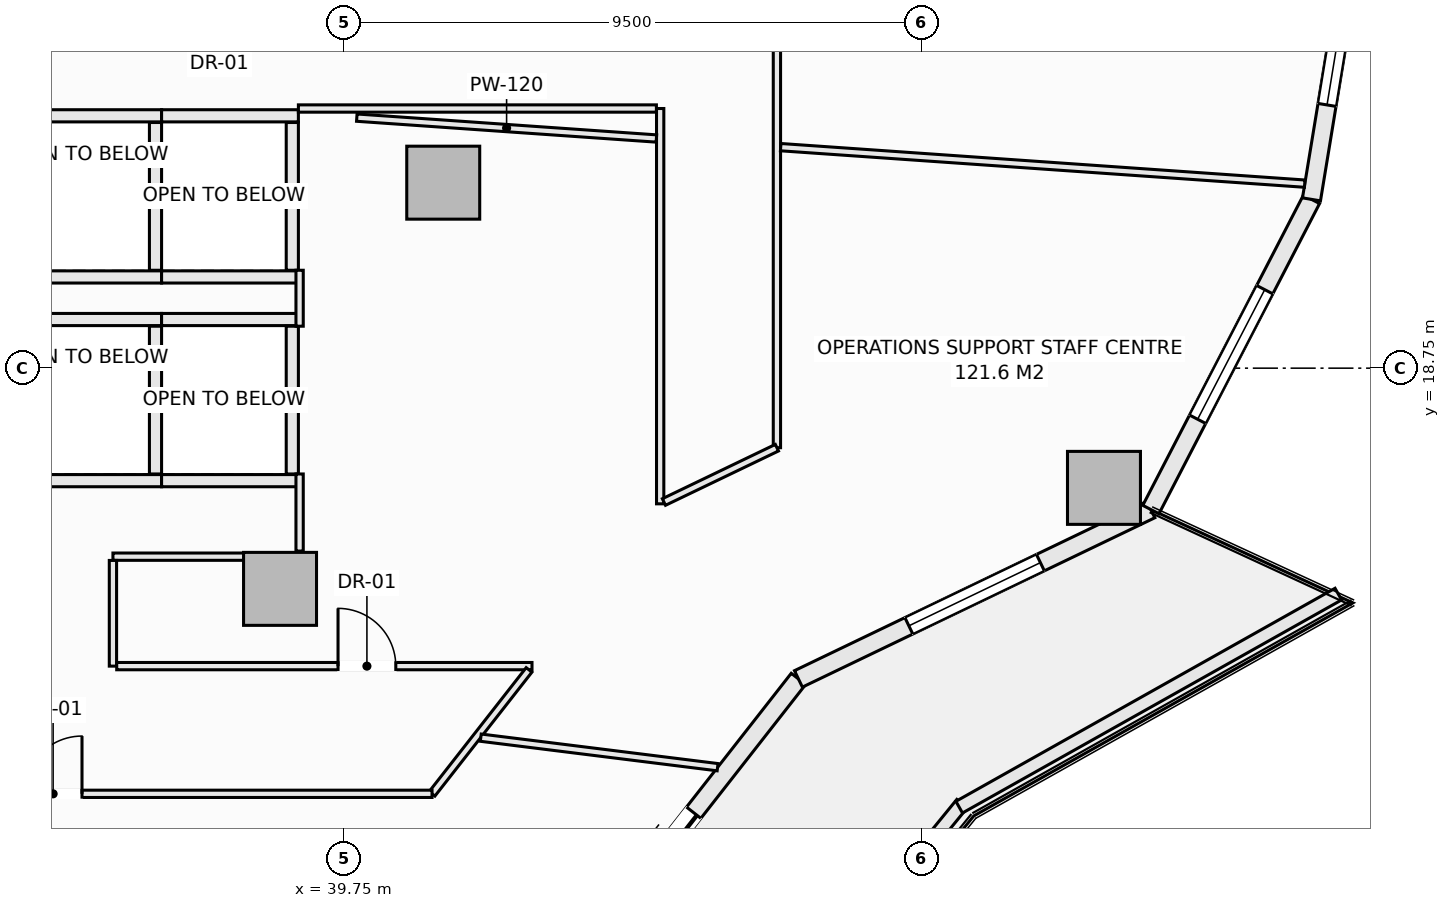
"""IFC4 building model, lengths in metres.
Left out: names, types, materials, properties, quantities, classifications, styles, units other than length and angle.
Written with IfcOpenShell. Run it as: python <this file> out.ifc"""

import sys

from ifc_helpers import new_model, si_unit, direction, frame, frame_2d, origin, origin_2d, place, context, subcontext, project, spatial, rectangle, extrude, element, fill, save


model = new_model("IFC4")
c1 = context("Model", 3, precision=1e-05, world=origin(), true_north=direction((0.0, 1.0)))
c2 = subcontext(c1, "Body", "Model", "MODEL_VIEW")
j1 = project(units=[si_unit("LENGTHUNIT", "METRE"), si_unit("PLANEANGLEUNIT", "RADIAN")], contexts=[c1])
p1 = place(None, origin())
s1 = spatial("IfcSite", under=j1, at=p1, CompositionType="ELEMENT")
p2 = place(p1, origin())
s2 = spatial("IfcBuilding", under=s1, at=p2, CompositionType="ELEMENT")
p3 = place(p2, frame((0.0, 0.0, 84.25)))
s3 = spatial("IfcBuildingStorey", under=s2, at=p3, CompositionType="ELEMENT", Elevation=84.25)
for number, where, z_axis, x_axis in (
    (1, (52.249, 16.781, -0.28), (0.0, 0.0, 1.0), (1.0, 0.0, 0.0)),
    (2, (38.698, 15.121, -0.28), (0.0, 0.0, 1.0), (1.0, 0.0, 0.0)),
    (3, (41.382, 21.801, -0.28), (0.0, 0.0, 1.0), (1.0, 0.0, 0.0)),
):
    element("IfcColumn", number, at=place(p3, frame(where, z_axis=z_axis, x_axis=x_axis)), inside=s3, PredefinedType="COLUMN", context=c2, shape_type="SweptSolid", body=[
        extrude(rectangle(XDim=1.2, YDim=1.2, at=origin_2d()), origin(), (0.0, 0.0, 1.0), 3.85),
    ])
p4 = place(p3, frame((43.344, 8.684, 0.0), z_axis=(0.0, 0.0, 1.0), x_axis=(0.616434798832, 0.78740595552, 0.0)))
e4 = element("IfcWall", 4, at=p4, inside=s3, PredefinedType="SOLIDWALL", context=c2, shape_type="SweptSolid", body=[
    extrude(rectangle(XDim=6.294, YDim=0.3, at=frame_2d((3.147, 0.0))), origin(), (0.0, 0.0, 1.0), 3.093),
])
p5 = place(p4, frame((1.7, 0.0, 0.0)))
e5 = element("IfcOpeningElement", 5, at=p5, cuts=e4, PredefinedType="OPENING", context=c2, shape_type="SweptSolid", body=[
    extrude(rectangle(XDim=1.8, YDim=2.25, at=frame_2d((0.9, 1.125))), frame((0.0, 0.16, 0.0), z_axis=(0.0, -1.0, 0.0), x_axis=(1.0, 0.0, 0.0)), (0.0, 0.0, 1.0), 0.32),
])
p6 = place(p3, frame((47.224, 13.64, 0.0), z_axis=(0.0, 0.0, 1.0), x_axis=(0.901354747727, 0.433081538224, 0.0)))
e6 = element("IfcWall", 6, at=p6, inside=s3, PredefinedType="SOLIDWALL", context=c2, shape_type="SweptSolid", body=[
    extrude(rectangle(XDim=6.431, YDim=0.3, at=frame_2d((3.215, 0.0))), origin(), (0.0, 0.0, 1.0), 3.093),
])
p7 = place(p6, frame((2.015, 0.0, 0.85)))
e7 = element("IfcOpeningElement", 7, at=p7, cuts=e6, PredefinedType="OPENING", context=c2, shape_type="SweptSolid", body=[
    extrude(rectangle(XDim=2.4, YDim=1.9, at=frame_2d((1.2, 0.95))), frame((0.0, 0.16, 0.0), z_axis=(0.0, -1.0, 0.0), x_axis=(1.0, 0.0, 0.0)), (0.0, 0.0, 1.0), 0.32),
])
p8 = place(p3, frame((53.021, 16.425, 0.0), z_axis=(0.0, 0.0, 1.0), x_axis=(0.459800981414, 0.888021991558, 0.0)))
e8 = element("IfcWall", 8, at=p8, inside=s3, PredefinedType="SOLIDWALL", context=c2, shape_type="SweptSolid", body=[
    extrude(rectangle(XDim=5.744, YDim=0.3, at=frame_2d((2.872, 0.0))), origin(), (0.0, 0.0, 1.0), 3.093),
])
p9 = place(p8, frame((1.672, 0.0, 0.85)))
e9 = element("IfcOpeningElement", 9, at=p9, cuts=e8, PredefinedType="OPENING", context=c2, shape_type="SweptSolid", body=[
    extrude(rectangle(XDim=2.4, YDim=1.9, at=frame_2d((1.2, 0.95))), frame((0.0, 0.16, 0.0), z_axis=(0.0, -1.0, 0.0), x_axis=(1.0, 0.0, 0.0)), (0.0, 0.0, 1.0), 0.32),
])
p10 = place(p3, frame((55.662, 21.526, 0.0), z_axis=(0.0, 0.0, 1.0), x_axis=(0.162386212206, 0.986727276447, 0.0)))
e10 = element("IfcWall", 10, at=p10, inside=s3, PredefinedType="SOLIDWALL", context=c2, shape_type="SweptSolid", body=[
    extrude(rectangle(XDim=5.548, YDim=0.3, at=frame_2d((2.774, 0.0))), origin(), (0.0, 0.0, 1.0), 3.093),
])
p11 = place(p10, frame((1.574, 0.0, 0.85)))
e11 = element("IfcOpeningElement", 11, at=p11, cuts=e10, PredefinedType="OPENING", context=c2, shape_type="SweptSolid", body=[
    extrude(rectangle(XDim=2.4, YDim=1.9, at=frame_2d((1.2, 0.95))), frame((0.0, 0.16, 0.0), z_axis=(0.0, -1.0, 0.0), x_axis=(1.0, 0.0, 0.0)), (0.0, 0.0, 1.0), 0.32),
])
p12 = place(p3, frame((45.292, 5.918, 0.0), z_axis=(0.0, 0.0, 1.0), x_axis=(0.631819273026, 0.775115737315, 0.0)))
e12 = element("IfcWall", 12, at=p12, inside=s3, PredefinedType="PARAPET", context=c2, shape_type="SweptSolid", body=[
    extrude(rectangle(XDim=7.316, YDim=0.22, at=frame_2d((3.658, 0.0))), origin(), (0.0, 0.0, 1.0), 0.52),
])
p13 = place(p3, frame((49.868, 11.531, 0.0), z_axis=(0.0, 0.0, 1.0), x_axis=(0.871775109335, 0.489906275468, 0.0)))
e13 = element("IfcWall", 13, at=p13, inside=s3, PredefinedType="PARAPET", context=c2, shape_type="SweptSolid", body=[
    extrude(rectangle(XDim=7.152, YDim=0.22, at=frame_2d((3.576, 0.0))), origin(), (0.0, 0.0, 1.0), 0.52),
])
for number, where, z_axis, x_axis in (
    (14, (34.5, 19.55, 0.0), (0.0, 0.0, 1.0), (1.0, 0.0, 0.0)),
    (15, (34.5, 16.9, 0.0), (0.0, 0.0, 1.0), (1.0, 0.0, 0.0)),
):
    element("IfcWall", number, at=place(p3, frame(where, z_axis=z_axis, x_axis=x_axis)), inside=s3, PredefinedType="SOLIDWALL", context=c2, shape_type="SweptSolid", body=[
        extrude(rectangle(XDim=2.25, YDim=0.2, at=frame_2d((1.125, 0.0))), origin(), (0.0, 0.0, 1.0), 3.57),
    ])
p14 = place(p3, frame((36.65, 17.01, 0.0), z_axis=(0.0, 0.0, 1.0), x_axis=(0.0, 1.0, 0.0)))
e16 = element("IfcWall", 16, at=p14, inside=s3, PredefinedType="SOLIDWALL", context=c2, shape_type="SweptSolid", body=[
    extrude(rectangle(XDim=2.43, YDim=0.2, at=frame_2d((1.215, 0.0))), origin(), (0.0, 0.0, 1.0), 3.57),
])
for number, where, z_axis, x_axis in (
    (17, (36.75, 19.55, 0.0), (0.0, 0.0, 1.0), (1.0, 0.0, 0.0)),
    (18, (36.75, 16.9, 0.0), (0.0, 0.0, 1.0), (1.0, 0.0, 0.0)),
):
    element("IfcWall", number, at=place(p3, frame(where, z_axis=z_axis, x_axis=x_axis)), inside=s3, PredefinedType="SOLIDWALL", context=c2, shape_type="SweptSolid", body=[
        extrude(rectangle(XDim=2.25, YDim=0.2, at=frame_2d((1.125, 0.0))), origin(), (0.0, 0.0, 1.0), 3.57),
    ])
p15 = place(p3, frame((38.9, 17.01, 0.0), z_axis=(0.0, 0.0, 1.0), x_axis=(0.0, 1.0, 0.0)))
e19 = element("IfcWall", 19, at=p15, inside=s3, PredefinedType="SOLIDWALL", context=c2, shape_type="SweptSolid", body=[
    extrude(rectangle(XDim=2.43, YDim=0.2, at=frame_2d((1.215, 0.0))), origin(), (0.0, 0.0, 1.0), 3.57),
])
for number, where, z_axis, x_axis in (
    (20, (34.5, 22.9, 0.0), (0.0, 0.0, 1.0), (1.0, 0.0, 0.0)),
    (21, (34.5, 20.25, 0.0), (0.0, 0.0, 1.0), (1.0, 0.0, 0.0)),
):
    element("IfcWall", number, at=place(p3, frame(where, z_axis=z_axis, x_axis=x_axis)), inside=s3, PredefinedType="SOLIDWALL", context=c2, shape_type="SweptSolid", body=[
        extrude(rectangle(XDim=2.25, YDim=0.2, at=frame_2d((1.125, 0.0))), origin(), (0.0, 0.0, 1.0), 3.57),
    ])
p16 = place(p3, frame((36.65, 20.36, 0.0), z_axis=(0.0, 0.0, 1.0), x_axis=(0.0, 1.0, 0.0)))
e22 = element("IfcWall", 22, at=p16, inside=s3, PredefinedType="SOLIDWALL", context=c2, shape_type="SweptSolid", body=[
    extrude(rectangle(XDim=2.43, YDim=0.2, at=frame_2d((1.215, 0.0))), origin(), (0.0, 0.0, 1.0), 3.57),
])
for number, where, z_axis, x_axis in (
    (23, (36.75, 22.9, 0.0), (0.0, 0.0, 1.0), (1.0, 0.0, 0.0)),
    (24, (36.75, 20.25, 0.0), (0.0, 0.0, 1.0), (1.0, 0.0, 0.0)),
):
    element("IfcWall", number, at=place(p3, frame(where, z_axis=z_axis, x_axis=x_axis)), inside=s3, PredefinedType="SOLIDWALL", context=c2, shape_type="SweptSolid", body=[
        extrude(rectangle(XDim=2.25, YDim=0.2, at=frame_2d((1.125, 0.0))), origin(), (0.0, 0.0, 1.0), 3.57),
    ])
p17 = place(p3, frame((38.9, 20.36, 0.0), z_axis=(0.0, 0.0, 1.0), x_axis=(0.0, 1.0, 0.0)))
e25 = element("IfcWall", 25, at=p17, inside=s3, PredefinedType="SOLIDWALL", context=c2, shape_type="SweptSolid", body=[
    extrude(rectangle(XDim=2.43, YDim=0.2, at=frame_2d((1.215, 0.0))), origin(), (0.0, 0.0, 1.0), 3.57),
])
p18 = place(p3, frame((35.95, 15.65, 0.0), z_axis=(0.0, 0.0, 1.0), x_axis=(1.0, 0.0, 0.0)))
e26 = element("IfcWall", 26, at=p18, inside=s3, PredefinedType="PARTITIONING", context=c2, shape_type="SweptSolid", body=[
    extrude(rectangle(XDim=2.291, YDim=0.12, at=frame_2d((1.146, 0.0))), origin(), (0.0, 0.0, 1.0), 3.57),
])
p19 = place(p3, frame((35.95, 13.85, 0.0), z_axis=(0.0, 0.0, 1.0), x_axis=(0.0, 1.0, 0.0)))
e27 = element("IfcWall", 27, at=p19, inside=s3, PredefinedType="PARTITIONING", context=c2, shape_type="SweptSolid", body=[
    extrude(rectangle(XDim=1.738, YDim=0.12, at=frame_2d((0.869, 0.0))), origin(), (0.0, 0.0, 1.0), 3.57),
])
p20 = place(p3, frame((36.012, 13.85, 0.0), z_axis=(0.0, 0.0, 1.0), x_axis=(1.0, 0.0, 0.0)))
e28 = element("IfcWall", 28, at=p20, inside=s3, PredefinedType="PARTITIONING", context=c2, shape_type="SweptSolid", body=[
    extrude(rectangle(XDim=6.83, YDim=0.12, at=frame_2d((3.415, 0.0))), origin(), (0.0, 0.0, 1.0), 3.57),
])
p21 = place(p20, frame((3.64, 0.0, 0.0)))
e29 = element("IfcOpeningElement", 29, at=p21, cuts=e28, PredefinedType="OPENING", context=c2, shape_type="SweptSolid", body=[
    extrude(rectangle(XDim=0.95, YDim=2.1, at=frame_2d((0.475, 1.05))), frame((0.0, 0.07, 0.0), z_axis=(0.0, -1.0, 0.0), x_axis=(1.0, 0.0, 0.0)), (0.0, 0.0, 1.0), 0.14),
])
p22 = place(p3, frame((41.198, 11.75, 0.0), z_axis=(0.0, 0.0, 1.0), x_axis=(0.616412533256, 0.787423386016, 0.0)))
e30 = element("IfcWall", 30, at=p22, inside=s3, PredefinedType="PARTITIONING", context=c2, shape_type="SweptSolid", body=[
    extrude(rectangle(XDim=2.588, YDim=0.12, at=frame_2d((1.294, 0.0))), origin(), (0.0, 0.0, 1.0), 3.57),
])
p23 = place(p3, frame((23.4, 11.75, 0.0), z_axis=(0.0, 0.0, 1.0), x_axis=(1.0, 0.0, 0.0)))
e31 = element("IfcWall", 31, at=p23, inside=s3, PredefinedType="PARTITIONING", context=c2, shape_type="SweptSolid", body=[
    extrude(rectangle(XDim=17.798, YDim=0.12, at=frame_2d((8.899, 0.0))), origin(), (0.0, 0.0, 1.0), 3.57),
])
p24 = place(p23, frame((3.094, 0.0, 0.0)))
e32 = element("IfcOpeningElement", 32, at=p24, cuts=e31, PredefinedType="OPENING", context=c2, shape_type="SweptSolid", body=[
    extrude(rectangle(XDim=0.95, YDim=2.1, at=frame_2d((0.475, 1.05))), frame((0.0, 0.07, 0.0), z_axis=(0.0, -1.0, 0.0), x_axis=(1.0, 0.0, 0.0)), (0.0, 0.0, 1.0), 0.14),
])
p25 = place(p23, frame((11.091, 0.0, 0.0)))
e33 = element("IfcOpeningElement", 33, at=p25, cuts=e31, PredefinedType="OPENING", context=c2, shape_type="SweptSolid", body=[
    extrude(rectangle(XDim=0.95, YDim=2.1, at=frame_2d((0.475, 1.05))), frame((0.0, 0.07, 0.0), z_axis=(0.0, -1.0, 0.0), x_axis=(1.0, 0.0, 0.0)), (0.0, 0.0, 1.0), 0.14),
])
p26 = place(p3, frame((44.95, 16.519, 0.0), z_axis=(0.0, 0.0, 1.0), x_axis=(0.0, 1.0, 0.0)))
e34 = element("IfcWall", 34, at=p26, inside=s3, PredefinedType="PARTITIONING", context=c2, shape_type="SweptSolid", body=[
    extrude(rectangle(XDim=6.501, YDim=0.12, at=frame_2d((3.25, 0.0))), origin(), (0.0, 0.0, 1.0), 3.57),
])
p27 = place(p3, frame((46.87, 17.442, 0.0), z_axis=(0.0, 0.0, 1.0), x_axis=(0.0, 1.0, 0.0)))
e35 = element("IfcWall", 35, at=p27, inside=s3, PredefinedType="PARTITIONING", context=c2, shape_type="SweptSolid", body=[
    extrude(rectangle(XDim=19.116, YDim=0.12, at=frame_2d((9.558, 0.0))), origin(), (0.0, 0.0, 1.0), 3.57),
])
p28 = place(p27, frame((11.352, 0.0, 0.0)))
e36 = element("IfcOpeningElement", 36, at=p28, cuts=e35, PredefinedType="OPENING", context=c2, shape_type="SweptSolid", body=[
    extrude(rectangle(XDim=0.95, YDim=2.1, at=frame_2d((0.475, 1.05))), frame((0.0, 0.07, 0.0), z_axis=(0.0, -1.0, 0.0), x_axis=(1.0, 0.0, 0.0)), (0.0, 0.0, 1.0), 0.14),
])
p29 = place(p3, frame((45.012, 16.549, 0.0), z_axis=(0.0, 0.0, 1.0), x_axis=(0.901304887575, 0.433185294803, 0.0)))
e37 = element("IfcWall", 37, at=p29, inside=s3, PredefinedType="PARTITIONING", context=c2, shape_type="SweptSolid", body=[
    extrude(rectangle(XDim=2.062, YDim=0.12, at=frame_2d((1.031, 0.0))), origin(), (0.0, 0.0, 1.0), 3.57),
])
p30 = place(p3, frame((39.0, 23.02, 0.0), z_axis=(0.0, 0.0, 1.0), x_axis=(1.0, 0.0, 0.0)))
e38 = element("IfcWall", 38, at=p30, inside=s3, PredefinedType="PARTITIONING", context=c2, shape_type="SweptSolid", body=[
    extrude(rectangle(XDim=5.888, YDim=0.12, at=frame_2d((2.944, 0.0))), origin(), (0.0, 0.0, 1.0), 3.57),
])
p31 = place(p3, frame((39.02, 15.742, 0.0), z_axis=(0.0, 0.0, 1.0), x_axis=(0.0, 1.0, 0.0)))
e39 = element("IfcWall", 39, at=p31, inside=s3, PredefinedType="PARTITIONING", context=c2, shape_type="SweptSolid", body=[
    extrude(rectangle(XDim=1.268, YDim=0.12, at=frame_2d((0.634, 0.0))), origin(), (0.0, 0.0, 1.0), 2.934),
])
p32 = place(p3, frame((39.02, 19.44, 0.0), z_axis=(0.0, 0.0, 1.0), x_axis=(0.0, 1.0, 0.0)))
e40 = element("IfcWall", 40, at=p32, inside=s3, PredefinedType="PARTITIONING", context=c2, shape_type="SweptSolid", body=[
    extrude(rectangle(XDim=0.92, YDim=0.12, at=frame_2d((0.46, 0.0))), origin(), (0.0, 0.0, 1.0), 3.57),
])
p33 = place(p3, frame((39.961, 22.87, 0.0), z_axis=(0.0, 0.0, 1.0), x_axis=(0.99758211908, -0.069497594858, 0.0)))
e41 = element("IfcWall", 41, at=p33, inside=s3, PredefinedType="PARTITIONING", context=c2, shape_type="SweptSolid", body=[
    extrude(rectangle(XDim=4.939, YDim=0.12, at=frame_2d((2.47, 0.0))), origin(), (0.0, 0.0, 1.0), 3.57),
])
p34 = place(p3, frame((46.932, 22.385, 0.0), z_axis=(0.0, 0.0, 1.0), x_axis=(0.997586585682, -0.069433450639, 0.0)))
e42 = element("IfcWall", 42, at=p34, inside=s3, PredefinedType="PARTITIONING", context=c2, shape_type="SweptSolid", body=[
    extrude(rectangle(XDim=8.639, YDim=0.12, at=frame_2d((4.32, 0.0))), origin(), (0.0, 0.0, 1.0), 3.205),
])
p35 = place(p3, frame((42.0, 12.674, 0.0), z_axis=(0.0, 0.0, 1.0), x_axis=(0.992316110302, -0.123728481908, 0.0)))
e43 = element("IfcWall", 43, at=p35, inside=s3, PredefinedType="PARTITIONING", context=c2, shape_type="SweptSolid", body=[
    extrude(rectangle(XDim=3.925, YDim=0.12, at=frame_2d((1.962, 0.0))), origin(), (0.0, 0.0, 1.0), 3.57),
])
p36 = place(p3, frame((29.818, 11.688, 0.0), z_axis=(0.0, 0.0, 1.0), x_axis=(0.944668147769, -0.328027575961, 0.0)))
e44 = element("IfcWall", 44, at=p36, inside=s3, PredefinedType="PARTITIONING", context=c2, shape_type="SweptSolid", body=[
    extrude(rectangle(XDim=11.428, YDim=0.12, at=frame_2d((5.714, 0.0))), origin(), (0.0, 0.0, 1.0), 3.093),
])
p37 = place(p5, frame((1.8, 0.0, 0.0), z_axis=(0.0, 0.0, 1.0), x_axis=(-1.0, 0.0, 0.0)))
e45 = element("IfcDoor", 45, at=p37, inside=s3, OperationType="SLIDING_TO_LEFT", PredefinedType="DOOR", context=c2, shape_type="SweptSolid", body=[
    extrude(rectangle(XDim=1.8, YDim=2.25, at=frame_2d((0.9, 1.125))), frame((0.0, 0.025, 0.0), z_axis=(0.0, -1.0, 0.0), x_axis=(1.0, 0.0, 0.0)), (0.0, 0.0, 1.0), 0.05),
])
fill(e5, e45)
p38 = place(p7, origin())
e46 = element("IfcWindow", 46, at=p38, inside=s3, PartitioningType="SINGLE_PANEL", PredefinedType="WINDOW", context=c2, shape_type="SweptSolid", body=[
    extrude(rectangle(XDim=2.4, YDim=1.9, at=frame_2d((1.2, 0.95))), frame((0.0, 0.03, 0.0), z_axis=(0.0, -1.0, 0.0), x_axis=(1.0, 0.0, 0.0)), (0.0, 0.0, 1.0), 0.06),
])
fill(e7, e46)
p39 = place(p9, origin())
e47 = element("IfcWindow", 47, at=p39, inside=s3, PartitioningType="SINGLE_PANEL", PredefinedType="WINDOW", context=c2, shape_type="SweptSolid", body=[
    extrude(rectangle(XDim=2.4, YDim=1.9, at=frame_2d((1.2, 0.95))), frame((0.0, 0.03, 0.0), z_axis=(0.0, -1.0, 0.0), x_axis=(1.0, 0.0, 0.0)), (0.0, 0.0, 1.0), 0.06),
])
fill(e9, e47)
p40 = place(p11, origin())
e48 = element("IfcWindow", 48, at=p40, inside=s3, PartitioningType="SINGLE_PANEL", PredefinedType="WINDOW", context=c2, shape_type="SweptSolid", body=[
    extrude(rectangle(XDim=2.4, YDim=1.9, at=frame_2d((1.2, 0.95))), frame((0.0, 0.03, 0.0), z_axis=(0.0, -1.0, 0.0), x_axis=(1.0, 0.0, 0.0)), (0.0, 0.0, 1.0), 0.06),
])
fill(e11, e48)
p41 = place(p25, origin())
e49 = element("IfcDoor", 49, at=p41, inside=s3, OperationType="SINGLE_SWING_RIGHT", PredefinedType="DOOR", context=c2, shape_type="SweptSolid", body=[
    extrude(rectangle(XDim=0.95, YDim=2.1, at=frame_2d((0.475, 1.05))), frame((0.0, 0.025, 0.0), z_axis=(0.0, -1.0, 0.0), x_axis=(1.0, 0.0, 0.0)), (0.0, 0.0, 1.0), 0.05),
])
fill(e33, e49)
p42 = place(p21, origin())
e50 = element("IfcDoor", 50, at=p42, inside=s3, OperationType="SINGLE_SWING_LEFT", PredefinedType="DOOR", context=c2, shape_type="SweptSolid", body=[
    extrude(rectangle(XDim=0.95, YDim=2.1, at=frame_2d((0.475, 1.05))), frame((0.0, 0.025, 0.0), z_axis=(0.0, -1.0, 0.0), x_axis=(1.0, 0.0, 0.0)), (0.0, 0.0, 1.0), 0.05),
])
fill(e29, e50)
save(model, sys.argv[1])
